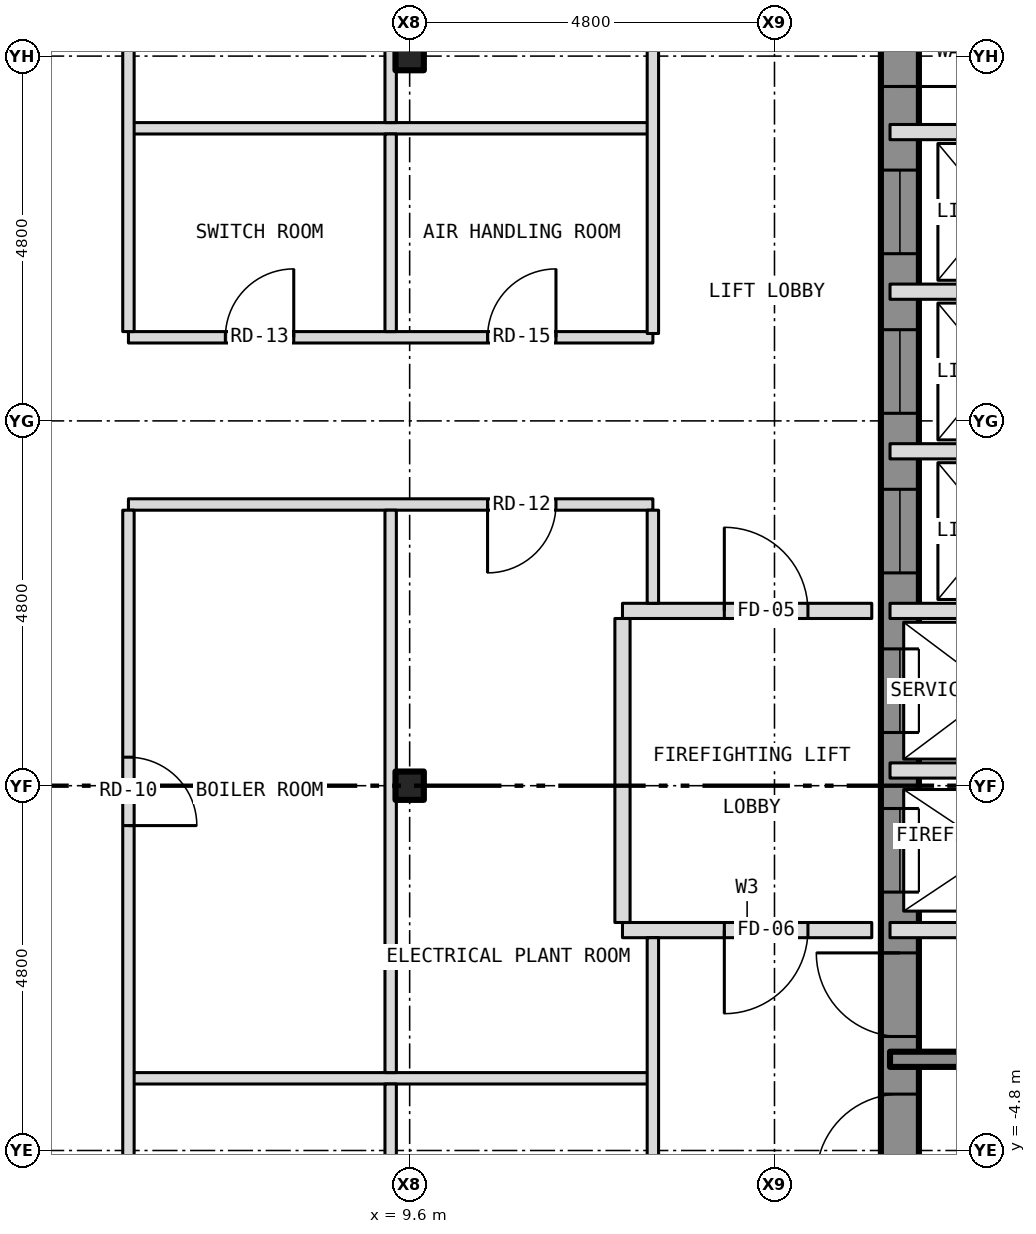
"""IFC4 building model, lengths in metres.
Left out: names, types, materials, properties, quantities, classifications, styles, units other than length and angle.
Written with IfcOpenShell. Run it as: python <this file> out.ifc"""

import sys

from ifc_helpers import new_model, si_unit, direction, frame, frame_2d, origin, origin_2d, place, context, subcontext, project, spatial, rectangle, i_section, extrude, element, fill, save


model = new_model("IFC4")
c1 = context("Model", 3, precision=1e-05, world=origin(), true_north=direction((0.0, 1.0)))
c2 = subcontext(c1, "Body", "Model", "MODEL_VIEW")
j1 = project(units=[si_unit("LENGTHUNIT", "METRE"), si_unit("PLANEANGLEUNIT", "RADIAN")], contexts=[c1])
p1 = place(None, origin())
s1 = spatial("IfcSite", under=j1, at=p1, CompositionType="ELEMENT")
p2 = place(p1, origin())
s2 = spatial("IfcBuilding", under=s1, at=p2, CompositionType="ELEMENT")
p3 = place(p2, frame((0.0, 0.0, 186.5)))
s3 = spatial("IfcBuildingStorey", under=s2, at=p3, CompositionType="ELEMENT", Elevation=186.5)
for number, where, z_axis, x_axis in (
    (1, (9.6, 0.0, -0.3), (0.0, 0.0, 1.0), (1.0, 0.0, 0.0)),
    (2, (9.6, 9.6, -0.3), (0.0, 0.0, 1.0), (1.0, 0.0, 0.0)),
):
    element("IfcColumn", number, at=place(p3, frame(where, z_axis=z_axis, x_axis=x_axis)), inside=s3, PredefinedType="COLUMN", context=c2, shape_type="SweptSolid", body=[
        extrude(i_section(OverallWidth=0.373, OverallDepth=0.373, WebThickness=0.016, FlangeThickness=0.026, at=origin_2d()), origin(), (0.0, 0.0, 1.0), 4.65),
    ])
p4 = place(p3, frame((16.05, -10.8, 0.0), z_axis=(0.0, 0.0, 1.0), x_axis=(0.0, 1.0, 0.0)))
e3 = element("IfcWall", 3, at=p4, inside=s3, PredefinedType="SHEAR", context=c2, shape_type="SweptSolid", body=[
    extrude(rectangle(XDim=21.6, YDim=0.5, at=frame_2d((10.8, 0.0))), origin(), (0.0, 0.0, 1.0), 3.9),
])
p5 = place(p4, frame((9.4, 0.0, 0.0)))
e4 = element("IfcOpeningElement", 4, at=p5, cuts=e3, PredefinedType="OPENING", context=c2, shape_type="SweptSolid", body=[
    extrude(rectangle(XDim=1.1, YDim=2.1, at=frame_2d((0.55, 1.05))), frame((0.0, 0.262, 0.0), z_axis=(0.0, -1.0, 0.0), x_axis=(1.0, 0.0, 0.0)), (0.0, 0.0, 1.0), 0.524),
])
p6 = place(p4, frame((11.5, 0.0, 0.0)))
e5 = element("IfcOpeningElement", 5, at=p6, cuts=e3, PredefinedType="OPENING", context=c2, shape_type="SweptSolid", body=[
    extrude(rectangle(XDim=1.1, YDim=2.1, at=frame_2d((0.55, 1.05))), frame((0.0, 0.262, 0.0), z_axis=(0.0, -1.0, 0.0), x_axis=(1.0, 0.0, 0.0)), (0.0, 0.0, 1.0), 0.524),
])
p7 = place(p4, frame((13.6, 0.0, 0.0)))
e6 = element("IfcOpeningElement", 6, at=p7, cuts=e3, PredefinedType="OPENING", context=c2, shape_type="SweptSolid", body=[
    extrude(rectangle(XDim=1.1, YDim=2.1, at=frame_2d((0.55, 1.05))), frame((0.0, 0.262, 0.0), z_axis=(0.0, -1.0, 0.0), x_axis=(1.0, 0.0, 0.0)), (0.0, 0.0, 1.0), 0.524),
])
p8 = place(p4, frame((15.7, 0.0, 0.0)))
e7 = element("IfcOpeningElement", 7, at=p8, cuts=e3, PredefinedType="OPENING", context=c2, shape_type="SweptSolid", body=[
    extrude(rectangle(XDim=1.1, YDim=2.1, at=frame_2d((0.55, 1.05))), frame((0.0, 0.262, 0.0), z_axis=(0.0, -1.0, 0.0), x_axis=(1.0, 0.0, 0.0)), (0.0, 0.0, 1.0), 0.524),
])
p9 = place(p4, frame((17.8, 0.0, 0.0)))
e8 = element("IfcOpeningElement", 8, at=p9, cuts=e3, PredefinedType="OPENING", context=c2, shape_type="SweptSolid", body=[
    extrude(rectangle(XDim=1.1, YDim=2.1, at=frame_2d((0.55, 1.05))), frame((0.0, 0.262, 0.0), z_axis=(0.0, -1.0, 0.0), x_axis=(1.0, 0.0, 0.0)), (0.0, 0.0, 1.0), 0.524),
])
p10 = place(p4, frame((5.642, 0.0, 0.0)))
e9 = element("IfcOpeningElement", 9, at=p10, cuts=e3, PredefinedType="OPENING", context=c2, shape_type="SweptSolid", body=[
    extrude(rectangle(XDim=1.1, YDim=2.1, at=frame_2d((0.55, 1.05))), frame((0.0, 0.262, 0.0), z_axis=(0.0, -1.0, 0.0), x_axis=(1.0, 0.0, 0.0)), (0.0, 0.0, 1.0), 0.524),
])
p11 = place(p4, frame((7.5, 0.0, 0.0)))
e10 = element("IfcOpeningElement", 10, at=p11, cuts=e3, PredefinedType="OPENING", context=c2, shape_type="SweptSolid", body=[
    extrude(rectangle(XDim=1.1, YDim=2.1, at=frame_2d((0.55, 1.05))), frame((0.0, 0.262, 0.0), z_axis=(0.0, -1.0, 0.0), x_axis=(1.0, 0.0, 0.0)), (0.0, 0.0, 1.0), 0.524),
])
p12 = place(p4, frame((20.0, 0.0, 0.0)))
e11 = element("IfcOpeningElement", 11, at=p12, cuts=e3, PredefinedType="OPENING", context=c2, shape_type="SweptSolid", body=[
    extrude(rectangle(XDim=0.9, YDim=2.1, at=frame_2d((0.45, 1.05))), frame((0.0, 0.262, 0.0), z_axis=(0.0, -1.0, 0.0), x_axis=(1.0, 0.0, 0.0)), (0.0, 0.0, 1.0), 0.524),
])
p13 = place(p3, frame((5.9, -3.85, 0.0), z_axis=(0.0, 0.0, 1.0), x_axis=(1.0, 0.0, 0.0)))
e12 = element("IfcWall", 12, at=p13, inside=s3, PredefinedType="PARTITIONING", context=c2, shape_type="SweptSolid", body=[
    extrude(rectangle(XDim=6.9, YDim=0.15, at=frame_2d((3.45, 0.0))), origin(), (0.0, 0.0, 1.0), 4.35),
])
p14 = place(p3, frame((15.92, -3.6, 0.0), z_axis=(0.0, 0.0, 1.0), x_axis=(1.0, 0.0, 0.0)))
e13 = element("IfcWall", 13, at=p14, inside=s3, PredefinedType="SHEAR", context=c2, shape_type="SweptSolid", body=[
    extrude(rectangle(XDim=4.08, YDim=0.2, at=frame_2d((2.04, 0.0))), origin(), (0.0, 0.0, 1.0), 3.9),
])
p15 = place(p3, frame((12.4, -1.9, 0.0), z_axis=(0.0, 0.0, 1.0), x_axis=(1.0, 0.0, 0.0)))
e14 = element("IfcWall", 14, at=p15, inside=s3, PredefinedType="PARTITIONING", context=c2, shape_type="SweptSolid", body=[
    extrude(rectangle(XDim=3.28, YDim=0.2, at=frame_2d((1.64, 0.0))), origin(), (0.0, 0.0, 1.0), 4.35),
])
p16 = place(p15, frame((1.34, 0.0, 0.0)))
e15 = element("IfcOpeningElement", 15, at=p16, cuts=e14, PredefinedType="OPENING", context=c2, shape_type="SweptSolid", body=[
    extrude(rectangle(XDim=1.1, YDim=2.1, at=frame_2d((0.55, 1.05))), frame((0.0, 0.112, 0.0), z_axis=(0.0, -1.0, 0.0), x_axis=(1.0, 0.0, 0.0)), (0.0, 0.0, 1.0), 0.224),
])
p17 = place(p3, frame((15.92, -1.9, 0.0), z_axis=(0.0, 0.0, 1.0), x_axis=(1.0, 0.0, 0.0)))
e16 = element("IfcWall", 16, at=p17, inside=s3, PredefinedType="PARTITIONING", context=c2, shape_type="SweptSolid", body=[
    extrude(rectangle(XDim=5.56, YDim=0.2, at=frame_2d((2.78, 0.0))), origin(), (0.0, 0.0, 1.0), 3.9),
])
p18 = place(p17, frame((3.83, 0.0, 0.0)))
e17 = element("IfcOpeningElement", 17, at=p18, cuts=e16, PredefinedType="OPENING", context=c2, shape_type="SweptSolid", body=[
    extrude(rectangle(XDim=0.9, YDim=2.1, at=frame_2d((0.45, 1.05))), frame((0.0, 0.112, 0.0), z_axis=(0.0, -1.0, 0.0), x_axis=(1.0, 0.0, 0.0)), (0.0, 0.0, 1.0), 0.224),
])
p19 = place(p3, frame((15.92, 0.2, 0.0), z_axis=(0.0, 0.0, 1.0), x_axis=(1.0, 0.0, 0.0)))
e18 = element("IfcWall", 18, at=p19, inside=s3, PredefinedType="PARTITIONING", context=c2, shape_type="SweptSolid", body=[
    extrude(rectangle(XDim=2.88, YDim=0.2, at=frame_2d((1.44, 0.0))), origin(), (0.0, 0.0, 1.0), 3.9),
])
p20 = place(p3, frame((12.4, 2.3, 0.0), z_axis=(0.0, 0.0, 1.0), x_axis=(1.0, 0.0, 0.0)))
e19 = element("IfcWall", 19, at=p20, inside=s3, PredefinedType="PARTITIONING", context=c2, shape_type="SweptSolid", body=[
    extrude(rectangle(XDim=3.28, YDim=0.2, at=frame_2d((1.64, 0.0))), origin(), (0.0, 0.0, 1.0), 4.35),
])
p21 = place(p20, frame((1.34, 0.0, 0.0)))
e20 = element("IfcOpeningElement", 20, at=p21, cuts=e19, PredefinedType="OPENING", context=c2, shape_type="SweptSolid", body=[
    extrude(rectangle(XDim=1.1, YDim=2.1, at=frame_2d((0.55, 1.05))), frame((0.0, 0.112, 0.0), z_axis=(0.0, -1.0, 0.0), x_axis=(1.0, 0.0, 0.0)), (0.0, 0.0, 1.0), 0.224),
])
p22 = place(p3, frame((15.92, 2.3, 0.0), z_axis=(0.0, 0.0, 1.0), x_axis=(1.0, 0.0, 0.0)))
e21 = element("IfcWall", 21, at=p22, inside=s3, PredefinedType="PARTITIONING", context=c2, shape_type="SweptSolid", body=[
    extrude(rectangle(XDim=2.88, YDim=0.2, at=frame_2d((1.44, 0.0))), origin(), (0.0, 0.0, 1.0), 3.9),
])
p23 = place(p3, frame((5.9, 3.7, 0.0), z_axis=(0.0, 0.0, 1.0), x_axis=(1.0, 0.0, 0.0)))
e22 = element("IfcWall", 22, at=p23, inside=s3, PredefinedType="PARTITIONING", context=c2, shape_type="SweptSolid", body=[
    extrude(rectangle(XDim=6.9, YDim=0.15, at=frame_2d((3.45, 0.0))), origin(), (0.0, 0.0, 1.0), 4.35),
])
p24 = place(p23, frame((4.725, 0.0, 0.0)))
e23 = element("IfcOpeningElement", 23, at=p24, cuts=e22, PredefinedType="OPENING", context=c2, shape_type="SweptSolid", body=[
    extrude(rectangle(XDim=0.9, YDim=2.1, at=frame_2d((0.45, 1.05))), frame((0.0, 0.087, 0.0), z_axis=(0.0, -1.0, 0.0), x_axis=(1.0, 0.0, 0.0)), (0.0, 0.0, 1.0), 0.174),
])
p25 = place(p3, frame((15.92, 4.4, 0.0), z_axis=(0.0, 0.0, 1.0), x_axis=(1.0, 0.0, 0.0)))
e24 = element("IfcWall", 24, at=p25, inside=s3, PredefinedType="PARTITIONING", context=c2, shape_type="SweptSolid", body=[
    extrude(rectangle(XDim=5.56, YDim=0.2, at=frame_2d((2.78, 0.0))), origin(), (0.0, 0.0, 1.0), 3.9),
])
p26 = place(p25, frame((3.83, 0.0, 0.0)))
e25 = element("IfcOpeningElement", 25, at=p26, cuts=e24, PredefinedType="OPENING", context=c2, shape_type="SweptSolid", body=[
    extrude(rectangle(XDim=0.9, YDim=2.1, at=frame_2d((0.45, 1.05))), frame((0.0, 0.112, 0.0), z_axis=(0.0, -1.0, 0.0), x_axis=(1.0, 0.0, 0.0)), (0.0, 0.0, 1.0), 0.224),
])
p27 = place(p3, frame((5.9, 5.9, 0.0), z_axis=(0.0, 0.0, 1.0), x_axis=(1.0, 0.0, 0.0)))
e26 = element("IfcWall", 26, at=p27, inside=s3, PredefinedType="PARTITIONING", context=c2, shape_type="SweptSolid", body=[
    extrude(rectangle(XDim=6.9, YDim=0.15, at=frame_2d((3.45, 0.0))), origin(), (0.0, 0.0, 1.0), 4.35),
])
p28 = place(p27, frame((1.275, 0.0, 0.0)))
e27 = element("IfcOpeningElement", 27, at=p28, cuts=e26, PredefinedType="OPENING", context=c2, shape_type="SweptSolid", body=[
    extrude(rectangle(XDim=0.9, YDim=2.1, at=frame_2d((0.45, 1.05))), frame((0.0, 0.087, 0.0), z_axis=(0.0, -1.0, 0.0), x_axis=(1.0, 0.0, 0.0)), (0.0, 0.0, 1.0), 0.174),
])
p29 = place(p27, frame((4.725, 0.0, 0.0)))
e28 = element("IfcOpeningElement", 28, at=p29, cuts=e26, PredefinedType="OPENING", context=c2, shape_type="SweptSolid", body=[
    extrude(rectangle(XDim=0.9, YDim=2.1, at=frame_2d((0.45, 1.05))), frame((0.0, 0.087, 0.0), z_axis=(0.0, -1.0, 0.0), x_axis=(1.0, 0.0, 0.0)), (0.0, 0.0, 1.0), 0.174),
])
for number, where, z_axis, x_axis in (
    (29, (15.92, 6.5, 0.0), (0.0, 0.0, 1.0), (1.0, 0.0, 0.0)),
    (30, (15.92, 8.6, 0.0), (0.0, 0.0, 1.0), (1.0, 0.0, 0.0)),
):
    element("IfcWall", number, at=place(p3, frame(where, z_axis=z_axis, x_axis=x_axis)), inside=s3, PredefinedType="PARTITIONING", context=c2, shape_type="SweptSolid", body=[
        extrude(rectangle(XDim=2.88, YDim=0.2, at=frame_2d((1.44, 0.0))), origin(), (0.0, 0.0, 1.0), 3.9),
    ])
p30 = place(p3, frame((5.9, 8.65, 0.0), z_axis=(0.0, 0.0, 1.0), x_axis=(1.0, 0.0, 0.0)))
e31 = element("IfcWall", 31, at=p30, inside=s3, PredefinedType="PARTITIONING", context=c2, shape_type="SweptSolid", body=[
    extrude(rectangle(XDim=6.9, YDim=0.15, at=frame_2d((3.45, 0.0))), origin(), (0.0, 0.0, 1.0), 4.35),
])
p31 = place(p3, frame((5.9, -11.325, 0.0), z_axis=(0.0, 0.0, 1.0), x_axis=(0.0, 1.0, 0.0)))
e32 = element("IfcWall", 32, at=p31, inside=s3, PredefinedType="PARTITIONING", context=c2, shape_type="SweptSolid", body=[
    extrude(rectangle(XDim=14.95, YDim=0.15, at=frame_2d((7.475, 0.0))), origin(), (0.0, 0.0, 1.0), 4.35),
])
p32 = place(p31, frame((3.25, 0.0, 0.0)))
e33 = element("IfcOpeningElement", 33, at=p32, cuts=e32, PredefinedType="OPENING", context=c2, shape_type="SweptSolid", body=[
    extrude(rectangle(XDim=0.9, YDim=2.1, at=frame_2d((0.45, 1.05))), frame((0.0, 0.087, 0.0), z_axis=(0.0, -1.0, 0.0), x_axis=(1.0, 0.0, 0.0)), (0.0, 0.0, 1.0), 0.174),
])
p33 = place(p31, frame((10.8, 0.0, 0.0)))
e34 = element("IfcOpeningElement", 34, at=p33, cuts=e32, PredefinedType="OPENING", context=c2, shape_type="SweptSolid", body=[
    extrude(rectangle(XDim=0.9, YDim=2.1, at=frame_2d((0.45, 1.05))), frame((0.0, 0.087, 0.0), z_axis=(0.0, -1.0, 0.0), x_axis=(1.0, 0.0, 0.0)), (0.0, 0.0, 1.0), 0.174),
])
p34 = place(p3, frame((5.9, 5.975, 0.0), z_axis=(0.0, 0.0, 1.0), x_axis=(0.0, 1.0, 0.0)))
e35 = element("IfcWall", 35, at=p34, inside=s3, PredefinedType="PARTITIONING", context=c2, shape_type="SweptSolid", body=[
    extrude(rectangle(XDim=5.35, YDim=0.15, at=frame_2d((2.675, 0.0))), origin(), (0.0, 0.0, 1.0), 4.35),
])
for number, where, z_axis, x_axis in (
    (36, (9.35, -11.325, 0.0), (0.0, 0.0, 1.0), (0.0, 1.0, 0.0)),
    (37, (9.35, -3.775, 0.0), (0.0, 0.0, 1.0), (0.0, 1.0, 0.0)),
):
    element("IfcWall", number, at=place(p3, frame(where, z_axis=z_axis, x_axis=x_axis)), inside=s3, PredefinedType="PARTITIONING", context=c2, shape_type="SweptSolid", body=[
        extrude(rectangle(XDim=7.4, YDim=0.15, at=frame_2d((3.7, 0.0))), origin(), (0.0, 0.0, 1.0), 4.35),
    ])
for number, where, z_axis, x_axis in (
    (38, (9.35, 5.975, 0.0), (0.0, 0.0, 1.0), (0.0, 1.0, 0.0)),
    (39, (9.35, 8.725, 0.0), (0.0, 0.0, 1.0), (0.0, 1.0, 0.0)),
):
    element("IfcWall", number, at=place(p3, frame(where, z_axis=z_axis, x_axis=x_axis)), inside=s3, PredefinedType="PARTITIONING", context=c2, shape_type="SweptSolid", body=[
        extrude(rectangle(XDim=2.6, YDim=0.15, at=frame_2d((1.3, 0.0))), origin(), (0.0, 0.0, 1.0), 4.35),
    ])
p35 = place(p3, frame((12.4, -1.8, 0.0), z_axis=(0.0, 0.0, 1.0), x_axis=(0.0, 1.0, 0.0)))
e40 = element("IfcWall", 40, at=p35, inside=s3, PredefinedType="PARTITIONING", context=c2, shape_type="SweptSolid", body=[
    extrude(rectangle(XDim=4.0, YDim=0.2, at=frame_2d((2.0, 0.0))), origin(), (0.0, 0.0, 1.0), 4.35),
])
p36 = place(p3, frame((12.8, -11.325, 0.0), z_axis=(0.0, 0.0, 1.0), x_axis=(0.0, 1.0, 0.0)))
e41 = element("IfcWall", 41, at=p36, inside=s3, PredefinedType="PARTITIONING", context=c2, shape_type="SweptSolid", body=[
    extrude(rectangle(XDim=9.325, YDim=0.15, at=frame_2d((4.663, 0.0))), origin(), (0.0, 0.0, 1.0), 4.35),
])
p37 = place(p36, frame((3.55, 0.0, 0.0)))
e42 = element("IfcOpeningElement", 42, at=p37, cuts=e41, PredefinedType="OPENING", context=c2, shape_type="SweptSolid", body=[
    extrude(rectangle(XDim=0.9, YDim=2.1, at=frame_2d((0.45, 1.05))), frame((0.0, 0.087, 0.0), z_axis=(0.0, -1.0, 0.0), x_axis=(1.0, 0.0, 0.0)), (0.0, 0.0, 1.0), 0.174),
])
p38 = place(p3, frame((12.8, 2.4, 0.0), z_axis=(0.0, 0.0, 1.0), x_axis=(0.0, 1.0, 0.0)))
e43 = element("IfcWall", 43, at=p38, inside=s3, PredefinedType="PARTITIONING", context=c2, shape_type="SweptSolid", body=[
    extrude(rectangle(XDim=1.225, YDim=0.15, at=frame_2d((0.613, 0.0))), origin(), (0.0, 0.0, 1.0), 4.35),
])
p39 = place(p3, frame((12.8, 5.95, 0.0), z_axis=(0.0, 0.0, 1.0), x_axis=(0.0, 1.0, 0.0)))
e44 = element("IfcWall", 44, at=p39, inside=s3, PredefinedType="PARTITIONING", context=c2, shape_type="SweptSolid", body=[
    extrude(rectangle(XDim=4.7, YDim=0.15, at=frame_2d((2.35, 0.0))), origin(), (0.0, 0.0, 1.0), 4.35),
])
p40 = place(p5, origin())
e45 = element("IfcDoor", 45, at=p40, inside=s3, OperationType="SLIDING_TO_LEFT", PredefinedType="DOOR", context=c2, shape_type="SweptSolid", body=[
    extrude(rectangle(XDim=1.1, YDim=2.1, at=frame_2d((0.55, 1.05))), frame((0.0, 0.025, 0.0), z_axis=(0.0, -1.0, 0.0), x_axis=(1.0, 0.0, 0.0)), (0.0, 0.0, 1.0), 0.05),
])
fill(e4, e45)
p41 = place(p6, origin())
e46 = element("IfcDoor", 46, at=p41, inside=s3, OperationType="SLIDING_TO_LEFT", PredefinedType="DOOR", context=c2, shape_type="SweptSolid", body=[
    extrude(rectangle(XDim=1.1, YDim=2.1, at=frame_2d((0.55, 1.05))), frame((0.0, 0.025, 0.0), z_axis=(0.0, -1.0, 0.0), x_axis=(1.0, 0.0, 0.0)), (0.0, 0.0, 1.0), 0.05),
])
fill(e5, e46)
p42 = place(p7, origin())
e47 = element("IfcDoor", 47, at=p42, inside=s3, OperationType="SLIDING_TO_LEFT", PredefinedType="DOOR", context=c2, shape_type="SweptSolid", body=[
    extrude(rectangle(XDim=1.1, YDim=2.1, at=frame_2d((0.55, 1.05))), frame((0.0, 0.025, 0.0), z_axis=(0.0, -1.0, 0.0), x_axis=(1.0, 0.0, 0.0)), (0.0, 0.0, 1.0), 0.05),
])
fill(e6, e47)
p43 = place(p8, origin())
e48 = element("IfcDoor", 48, at=p43, inside=s3, OperationType="SLIDING_TO_LEFT", PredefinedType="DOOR", context=c2, shape_type="SweptSolid", body=[
    extrude(rectangle(XDim=1.1, YDim=2.1, at=frame_2d((0.55, 1.05))), frame((0.0, 0.025, 0.0), z_axis=(0.0, -1.0, 0.0), x_axis=(1.0, 0.0, 0.0)), (0.0, 0.0, 1.0), 0.05),
])
fill(e7, e48)
p44 = place(p9, origin())
e49 = element("IfcDoor", 49, at=p44, inside=s3, OperationType="SLIDING_TO_LEFT", PredefinedType="DOOR", context=c2, shape_type="SweptSolid", body=[
    extrude(rectangle(XDim=1.1, YDim=2.1, at=frame_2d((0.55, 1.05))), frame((0.0, 0.025, 0.0), z_axis=(0.0, -1.0, 0.0), x_axis=(1.0, 0.0, 0.0)), (0.0, 0.0, 1.0), 0.05),
])
fill(e8, e49)
p45 = place(p10, origin())
e50 = element("IfcDoor", 50, at=p45, inside=s3, OperationType="SINGLE_SWING_LEFT", PredefinedType="DOOR", context=c2, shape_type="SweptSolid", body=[
    extrude(rectangle(XDim=1.1, YDim=2.1, at=frame_2d((0.55, 1.05))), frame((0.0, 0.025, 0.0), z_axis=(0.0, -1.0, 0.0), x_axis=(1.0, 0.0, 0.0)), (0.0, 0.0, 1.0), 0.05),
])
fill(e9, e50)
p46 = place(p11, origin())
e51 = element("IfcDoor", 51, at=p46, inside=s3, OperationType="SINGLE_SWING_RIGHT", PredefinedType="DOOR", context=c2, shape_type="SweptSolid", body=[
    extrude(rectangle(XDim=1.1, YDim=2.1, at=frame_2d((0.55, 1.05))), frame((0.0, 0.025, 0.0), z_axis=(0.0, -1.0, 0.0), x_axis=(1.0, 0.0, 0.0)), (0.0, 0.0, 1.0), 0.05),
])
fill(e10, e51)
p47 = place(p12, origin())
e52 = element("IfcDoor", 52, at=p47, inside=s3, OperationType="SINGLE_SWING_LEFT", PredefinedType="DOOR", context=c2, shape_type="SweptSolid", body=[
    extrude(rectangle(XDim=0.9, YDim=2.1, at=frame_2d((0.45, 1.05))), frame((0.0, 0.025, 0.0), z_axis=(0.0, -1.0, 0.0), x_axis=(1.0, 0.0, 0.0)), (0.0, 0.0, 1.0), 0.05),
])
fill(e11, e52)
p48 = place(p21, origin())
e53 = element("IfcDoor", 53, at=p48, inside=s3, OperationType="SINGLE_SWING_LEFT", PredefinedType="DOOR", context=c2, shape_type="SweptSolid", body=[
    extrude(rectangle(XDim=1.1, YDim=2.1, at=frame_2d((0.55, 1.05))), frame((0.0, 0.025, 0.0), z_axis=(0.0, -1.0, 0.0), x_axis=(1.0, 0.0, 0.0)), (0.0, 0.0, 1.0), 0.05),
])
fill(e20, e53)
p49 = place(p16, origin())
e54 = element("IfcDoor", 54, at=p49, inside=s3, OperationType="SINGLE_SWING_LEFT", PredefinedType="DOOR", context=c2, shape_type="SweptSolid", body=[
    extrude(rectangle(XDim=1.1, YDim=2.1, at=frame_2d((0.55, 1.05))), frame((0.0, 0.025, 0.0), z_axis=(0.0, -1.0, 0.0), x_axis=(1.0, 0.0, 0.0)), (0.0, 0.0, 1.0), 0.05),
])
fill(e15, e54)
p50 = place(p33, origin())
e55 = element("IfcDoor", 55, at=p50, inside=s3, OperationType="SINGLE_SWING_LEFT", PredefinedType="DOOR", context=c2, shape_type="SweptSolid", body=[
    extrude(rectangle(XDim=0.9, YDim=2.1, at=frame_2d((0.45, 1.05))), frame((0.0, 0.025, 0.0), z_axis=(0.0, -1.0, 0.0), x_axis=(1.0, 0.0, 0.0)), (0.0, 0.0, 1.0), 0.05),
])
fill(e34, e55)
p51 = place(p24, origin())
e56 = element("IfcDoor", 56, at=p51, inside=s3, OperationType="SINGLE_SWING_LEFT", PredefinedType="DOOR", context=c2, shape_type="SweptSolid", body=[
    extrude(rectangle(XDim=0.9, YDim=2.1, at=frame_2d((0.45, 1.05))), frame((0.0, 0.025, 0.0), z_axis=(0.0, -1.0, 0.0), x_axis=(1.0, 0.0, 0.0)), (0.0, 0.0, 1.0), 0.05),
])
fill(e23, e56)
p52 = place(p28, origin())
e57 = element("IfcDoor", 57, at=p52, inside=s3, OperationType="SINGLE_SWING_RIGHT", PredefinedType="DOOR", context=c2, shape_type="SweptSolid", body=[
    extrude(rectangle(XDim=0.9, YDim=2.1, at=frame_2d((0.45, 1.05))), frame((0.0, 0.025, 0.0), z_axis=(0.0, -1.0, 0.0), x_axis=(1.0, 0.0, 0.0)), (0.0, 0.0, 1.0), 0.05),
])
fill(e27, e57)
p53 = place(p29, origin())
e58 = element("IfcDoor", 58, at=p53, inside=s3, OperationType="SINGLE_SWING_RIGHT", PredefinedType="DOOR", context=c2, shape_type="SweptSolid", body=[
    extrude(rectangle(XDim=0.9, YDim=2.1, at=frame_2d((0.45, 1.05))), frame((0.0, 0.025, 0.0), z_axis=(0.0, -1.0, 0.0), x_axis=(1.0, 0.0, 0.0)), (0.0, 0.0, 1.0), 0.05),
])
fill(e28, e58)
save(model, sys.argv[1])
